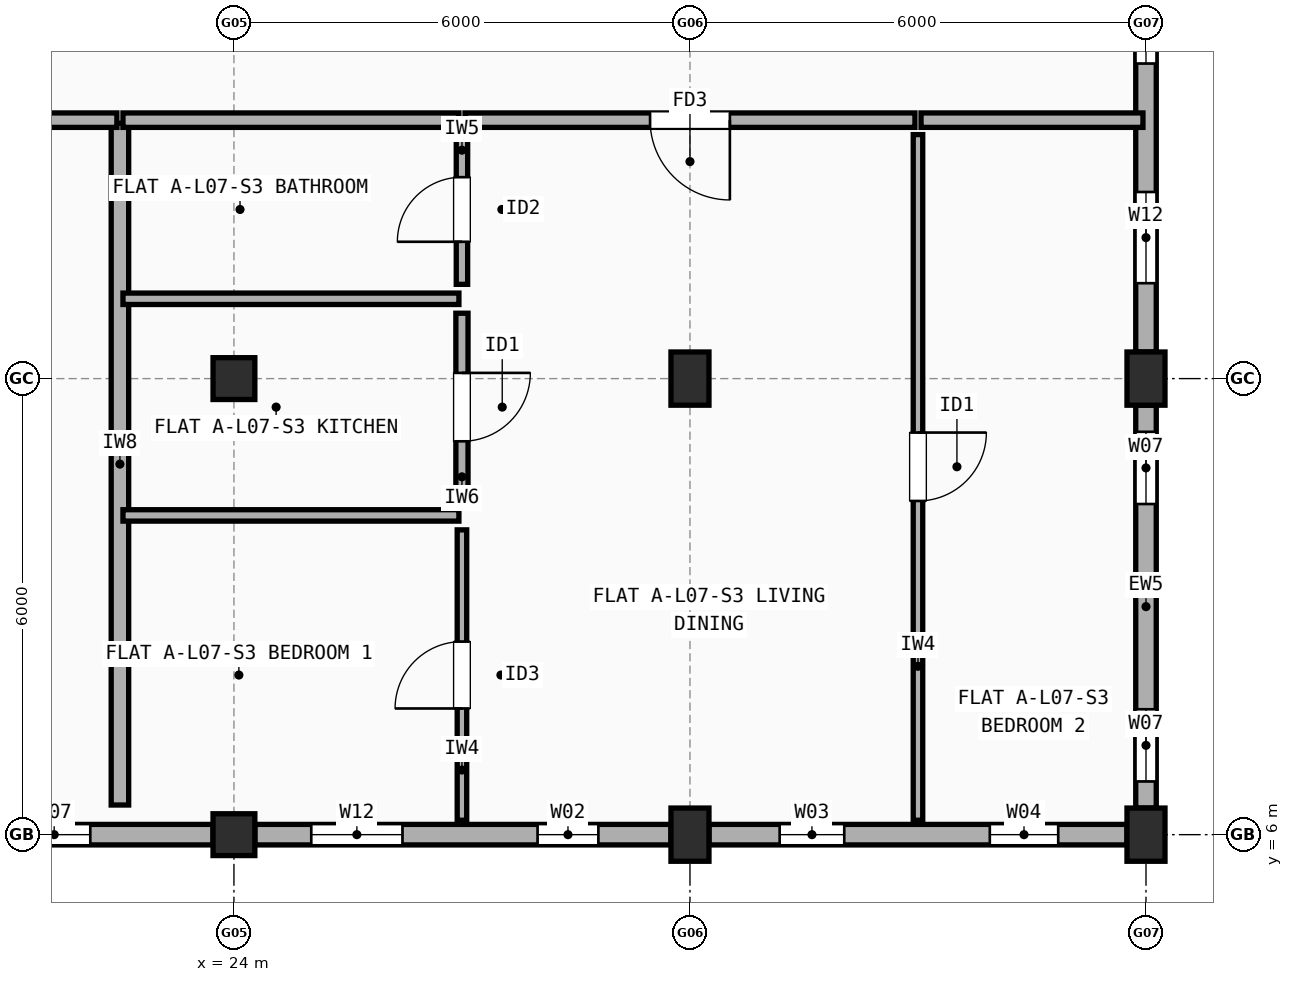
"""IFC4 building model, lengths in metres.
Left out: names, types, materials, properties, quantities, classifications, styles, units other than length and angle.
Written with IfcOpenShell. Run it as: python <this file> out.ifc"""

import sys

from ifc_helpers import new_model, si_unit, direction, frame, frame_2d, origin, origin_2d, place, context, subcontext, project, spatial, rectangle, extrude, element, fill, save


model = new_model("IFC4")
c1 = context("Model", 3, precision=1e-05, world=origin(), true_north=direction((0.0, 1.0)))
c2 = subcontext(c1, "Body", "Model", "MODEL_VIEW")
j1 = project(units=[si_unit("LENGTHUNIT", "METRE"), si_unit("PLANEANGLEUNIT", "RADIAN")], contexts=[c1])
p1 = place(None, origin())
s1 = spatial("IfcSite", under=j1, at=p1, CompositionType="ELEMENT")
p2 = place(p1, origin())
s2 = spatial("IfcBuilding", under=s1, at=p2, CompositionType="ELEMENT")
p3 = place(p2, frame((0.0, 0.0, 23.7)))
s3 = spatial("IfcBuildingStorey", under=s2, at=p3, CompositionType="ELEMENT", Elevation=23.7)
for number, where, z_axis, x_axis in (
    (1, (24.0, 6.0, 0.0), (0.0, 0.0, 1.0), (1.0, 0.0, 0.0)),
    (2, (24.0, 12.0, 0.0), (0.0, 0.0, 1.0), (1.0, 0.0, 0.0)),
):
    element("IfcColumn", number, at=place(p3, frame(where, z_axis=z_axis, x_axis=x_axis)), inside=s3, PredefinedType="COLUMN", context=c2, shape_type="SweptSolid", body=[
        extrude(rectangle(XDim=0.55, YDim=0.55, at=origin_2d()), origin(), (0.0, 0.0, 1.0), 2.975),
    ])
for number, where, z_axis, x_axis in (
    (3, (30.0, 6.0, 0.0), (0.0, 0.0, 1.0), (1.0, 0.0, 0.0)),
    (4, (30.0, 12.0, 0.0), (0.0, 0.0, 1.0), (1.0, 0.0, 0.0)),
    (5, (36.0, 6.0, 0.0), (0.0, 0.0, 1.0), (1.0, 0.0, 0.0)),
    (6, (36.0, 12.0, 0.0), (0.0, 0.0, 1.0), (1.0, 0.0, 0.0)),
):
    element("IfcColumn", number, at=place(p3, frame(where, z_axis=z_axis, x_axis=x_axis)), inside=s3, PredefinedType="COLUMN", context=c2, shape_type="SweptSolid", body=[
        extrude(rectangle(XDim=0.5, YDim=0.7, at=origin_2d()), origin(), (0.0, 0.0, 1.0), 2.975),
    ])
p4 = place(p3, frame((18.275, 6.0, 0.0), z_axis=(0.0, 0.0, 1.0), x_axis=(1.0, 0.0, 0.0)))
e7 = element("IfcWall", 7, at=p4, inside=s3, PredefinedType="STANDARD", context=c2, shape_type="SweptSolid", body=[
    extrude(rectangle(XDim=5.45, YDim=0.27, at=frame_2d((2.725, 0.0))), origin(), (0.0, 0.0, 1.0), 2.457),
])
p5 = place(p4, frame((0.35, 0.0, 0.9)))
e8 = element("IfcOpeningElement", 8, at=p5, cuts=e7, PredefinedType="OPENING", context=c2, shape_type="SweptSolid", body=[
    extrude(rectangle(XDim=0.95, YDim=1.35, at=frame_2d((0.475, 0.675))), frame((0.0, 0.145, 0.0), z_axis=(0.0, -1.0, 0.0), x_axis=(1.0, 0.0, 0.0)), (0.0, 0.0, 1.0), 0.29),
])
p6 = place(p4, frame((2.885, 0.0, 0.9)))
e9 = element("IfcOpeningElement", 9, at=p6, cuts=e7, PredefinedType="OPENING", context=c2, shape_type="SweptSolid", body=[
    extrude(rectangle(XDim=0.95, YDim=1.35, at=frame_2d((0.475, 0.675))), frame((0.0, 0.145, 0.0), z_axis=(0.0, -1.0, 0.0), x_axis=(1.0, 0.0, 0.0)), (0.0, 0.0, 1.0), 0.29),
])
p7 = place(p3, frame((24.275, 6.0, 0.0), z_axis=(0.0, 0.0, 1.0), x_axis=(1.0, 0.0, 0.0)))
e10 = element("IfcWall", 10, at=p7, inside=s3, PredefinedType="STANDARD", context=c2, shape_type="SweptSolid", body=[
    extrude(rectangle(XDim=5.475, YDim=0.27, at=frame_2d((2.738, 0.0))), origin(), (0.0, 0.0, 1.0), 2.457),
])
p8 = place(p7, frame((0.742, 0.0, 0.9)))
e11 = element("IfcOpeningElement", 11, at=p8, cuts=e10, PredefinedType="OPENING", context=c2, shape_type="SweptSolid", body=[
    extrude(rectangle(XDim=1.2, YDim=1.35, at=frame_2d((0.6, 0.675))), frame((0.0, 0.145, 0.0), z_axis=(0.0, -1.0, 0.0), x_axis=(1.0, 0.0, 0.0)), (0.0, 0.0, 1.0), 0.29),
])
p9 = place(p7, frame((3.72, 0.0, 0.9)))
e12 = element("IfcOpeningElement", 12, at=p9, cuts=e10, PredefinedType="OPENING", context=c2, shape_type="SweptSolid", body=[
    extrude(rectangle(XDim=0.8, YDim=1.2, at=frame_2d((0.4, 0.6))), frame((0.0, 0.145, 0.0), z_axis=(0.0, -1.0, 0.0), x_axis=(1.0, 0.0, 0.0)), (0.0, 0.0, 1.0), 0.29),
])
p10 = place(p3, frame((30.25, 6.0, 0.0), z_axis=(0.0, 0.0, 1.0), x_axis=(1.0, 0.0, 0.0)))
e13 = element("IfcWall", 13, at=p10, inside=s3, PredefinedType="STANDARD", context=c2, shape_type="SweptSolid", body=[
    extrude(rectangle(XDim=5.5, YDim=0.27, at=frame_2d((2.75, 0.0))), origin(), (0.0, 0.0, 1.0), 2.457),
])
p11 = place(p10, frame((0.93, 0.0, 0.9)))
e14 = element("IfcOpeningElement", 14, at=p11, cuts=e13, PredefinedType="OPENING", context=c2, shape_type="SweptSolid", body=[
    extrude(rectangle(XDim=0.85, YDim=1.25, at=frame_2d((0.425, 0.625))), frame((0.0, 0.145, 0.0), z_axis=(0.0, -1.0, 0.0), x_axis=(1.0, 0.0, 0.0)), (0.0, 0.0, 1.0), 0.29),
])
p12 = place(p10, frame((3.695, 0.0, 0.9)))
e15 = element("IfcOpeningElement", 15, at=p12, cuts=e13, PredefinedType="OPENING", context=c2, shape_type="SweptSolid", body=[
    extrude(rectangle(XDim=0.9, YDim=1.3, at=frame_2d((0.45, 0.65))), frame((0.0, 0.145, 0.0), z_axis=(0.0, -1.0, 0.0), x_axis=(1.0, 0.0, 0.0)), (0.0, 0.0, 1.0), 0.29),
])
p13 = place(p3, frame((36.0, 6.35, 0.0), z_axis=(0.0, 0.0, 1.0), x_axis=(0.0, 1.0, 0.0)))
e16 = element("IfcWall", 16, at=p13, inside=s3, PredefinedType="STANDARD", context=c2, shape_type="SweptSolid", body=[
    extrude(rectangle(XDim=5.3, YDim=0.27, at=frame_2d((2.65, 0.0))), origin(), (0.0, 0.0, 1.0), 2.457),
])
p14 = place(p13, frame((0.35, 0.0, 0.9)))
e17 = element("IfcOpeningElement", 17, at=p14, cuts=e16, PredefinedType="OPENING", context=c2, shape_type="SweptSolid", body=[
    extrude(rectangle(XDim=0.95, YDim=1.35, at=frame_2d((0.475, 0.675))), frame((0.0, 0.145, 0.0), z_axis=(0.0, -1.0, 0.0), x_axis=(1.0, 0.0, 0.0)), (0.0, 0.0, 1.0), 0.29),
])
p15 = place(p13, frame((4.0, 0.0, 0.9)))
e18 = element("IfcOpeningElement", 18, at=p15, cuts=e16, PredefinedType="OPENING", context=c2, shape_type="SweptSolid", body=[
    extrude(rectangle(XDim=0.95, YDim=1.35, at=frame_2d((0.475, 0.675))), frame((0.0, 0.145, 0.0), z_axis=(0.0, -1.0, 0.0), x_axis=(1.0, 0.0, 0.0)), (0.0, 0.0, 1.0), 0.29),
])
p16 = place(p3, frame((36.0, 12.35, 0.0), z_axis=(0.0, 0.0, 1.0), x_axis=(0.0, 1.0, 0.0)))
e19 = element("IfcWall", 19, at=p16, inside=s3, PredefinedType="STANDARD", context=c2, shape_type="SweptSolid", body=[
    extrude(rectangle(XDim=5.3, YDim=0.27, at=frame_2d((2.65, 0.0))), origin(), (0.0, 0.0, 1.0), 2.457),
])
p17 = place(p16, frame((0.905, 0.0, 0.9)))
e20 = element("IfcOpeningElement", 20, at=p17, cuts=e19, PredefinedType="OPENING", context=c2, shape_type="SweptSolid", body=[
    extrude(rectangle(XDim=1.2, YDim=1.35, at=frame_2d((0.6, 0.675))), frame((0.0, 0.145, 0.0), z_axis=(0.0, -1.0, 0.0), x_axis=(1.0, 0.0, 0.0)), (0.0, 0.0, 1.0), 0.29),
])
p18 = place(p16, frame((3.795, 0.0, 0.9)))
e21 = element("IfcOpeningElement", 21, at=p18, cuts=e19, PredefinedType="OPENING", context=c2, shape_type="SweptSolid", body=[
    extrude(rectangle(XDim=0.8, YDim=1.2, at=frame_2d((0.4, 0.6))), frame((0.0, 0.145, 0.0), z_axis=(0.0, -1.0, 0.0), x_axis=(1.0, 0.0, 0.0)), (0.0, 0.0, 1.0), 0.29),
])
p19 = place(p3, frame((22.5, 6.39, 0.0), z_axis=(0.0, 0.0, 1.0), x_axis=(0.0, 1.0, 0.0)))
e22 = element("IfcWall", 22, at=p19, inside=s3, PredefinedType="SOLIDWALL", context=c2, shape_type="SweptSolid", body=[
    extrude(rectangle(XDim=8.97, YDim=0.23, at=frame_2d((4.485, 0.0))), origin(), (0.0, 0.0, 1.0), 2.408),
])
p20 = place(p3, frame((16.54, 15.4, 0.0), z_axis=(0.0, 0.0, 1.0), x_axis=(1.0, 0.0, 0.0)))
e23 = element("IfcWall", 23, at=p20, inside=s3, PredefinedType="SOLIDWALL", context=c2, shape_type="SweptSolid", body=[
    extrude(rectangle(XDim=5.92, YDim=0.19, at=frame_2d((2.96, 0.0))), origin(), (0.0, 0.0, 1.0), 2.548),
])
p21 = place(p20, frame((2.47, 0.0, 0.0)))
e24 = element("IfcOpeningElement", 24, at=p21, cuts=e23, PredefinedType="OPENING", context=c2, shape_type="SweptSolid", body=[
    extrude(rectangle(XDim=0.98, YDim=2.15, at=frame_2d((0.49, 1.075))), frame((0.0, 0.105, 0.0), z_axis=(0.0, -1.0, 0.0), x_axis=(1.0, 0.0, 0.0)), (0.0, 0.0, 1.0), 0.21),
])
p22 = place(p3, frame((22.54, 15.4, 0.0), z_axis=(0.0, 0.0, 1.0), x_axis=(1.0, 0.0, 0.0)))
e25 = element("IfcWall", 25, at=p22, inside=s3, PredefinedType="SOLIDWALL", context=c2, shape_type="SweptSolid", body=[
    extrude(rectangle(XDim=4.42, YDim=0.19, at=frame_2d((2.21, 0.0))), origin(), (0.0, 0.0, 1.0), 2.548),
])
p23 = place(p3, frame((27.04, 15.4, 0.0), z_axis=(0.0, 0.0, 1.0), x_axis=(1.0, 0.0, 0.0)))
e26 = element("IfcWall", 26, at=p23, inside=s3, PredefinedType="SOLIDWALL", context=c2, shape_type="SweptSolid", body=[
    extrude(rectangle(XDim=5.92, YDim=0.19, at=frame_2d((2.96, 0.0))), origin(), (0.0, 0.0, 1.0), 2.457),
])
p24 = place(p23, frame((2.435, 0.0, 0.0)))
e27 = element("IfcOpeningElement", 27, at=p24, cuts=e26, PredefinedType="OPENING", context=c2, shape_type="SweptSolid", body=[
    extrude(rectangle(XDim=1.05, YDim=2.15, at=frame_2d((0.525, 1.075))), frame((0.0, 0.105, 0.0), z_axis=(0.0, -1.0, 0.0), x_axis=(1.0, 0.0, 0.0)), (0.0, 0.0, 1.0), 0.21),
])
p25 = place(p3, frame((27.0, 6.19, 0.0), z_axis=(0.0, 0.0, 1.0), x_axis=(0.0, 1.0, 0.0)))
e28 = element("IfcWall", 28, at=p25, inside=s3, PredefinedType="PARTITIONING", context=c2, shape_type="SweptSolid", body=[
    extrude(rectangle(XDim=3.82, YDim=0.125, at=frame_2d((1.91, 0.0))), origin(), (0.0, 0.0, 1.0), 2.975),
])
p26 = place(p25, frame((1.47, 0.0, 0.0)))
e29 = element("IfcOpeningElement", 29, at=p26, cuts=e28, PredefinedType="OPENING", context=c2, shape_type="SweptSolid", body=[
    extrude(rectangle(XDim=0.88, YDim=2.1, at=frame_2d((0.44, 1.05))), frame((0.0, 0.073, 0.0), z_axis=(0.0, -1.0, 0.0), x_axis=(1.0, 0.0, 0.0)), (0.0, 0.0, 1.0), 0.145),
])
p27 = place(p3, frame((27.0, 10.39, 0.0), z_axis=(0.0, 0.0, 1.0), x_axis=(0.0, 1.0, 0.0)))
e30 = element("IfcWall", 30, at=p27, inside=s3, PredefinedType="PLUMBINGWALL", context=c2, shape_type="SweptSolid", body=[
    extrude(rectangle(XDim=2.47, YDim=0.16, at=frame_2d((1.235, 0.0))), origin(), (0.0, 0.0, 1.0), 2.548),
])
p28 = place(p27, frame((0.785, 0.0, 0.0)))
e31 = element("IfcOpeningElement", 31, at=p28, cuts=e30, PredefinedType="OPENING", context=c2, shape_type="SweptSolid", body=[
    extrude(rectangle(XDim=0.9, YDim=2.1, at=frame_2d((0.45, 1.05))), frame((0.0, 0.09, 0.0), z_axis=(0.0, -1.0, 0.0), x_axis=(1.0, 0.0, 0.0)), (0.0, 0.0, 1.0), 0.18),
])
p29 = place(p3, frame((27.0, 13.24, 0.0), z_axis=(0.0, 0.0, 1.0), x_axis=(0.0, 1.0, 0.0)))
e32 = element("IfcWall", 32, at=p29, inside=s3, PredefinedType="PARTITIONING", context=c2, shape_type="SweptSolid", body=[
    extrude(rectangle(XDim=1.97, YDim=0.15, at=frame_2d((0.985, 0.0))), origin(), (0.0, 0.0, 1.0), 2.975),
])
p30 = place(p29, frame((0.56, 0.0, 0.0)))
e33 = element("IfcOpeningElement", 33, at=p30, cuts=e32, PredefinedType="OPENING", context=c2, shape_type="SweptSolid", body=[
    extrude(rectangle(XDim=0.85, YDim=2.1, at=frame_2d((0.425, 1.05))), frame((0.0, 0.085, 0.0), z_axis=(0.0, -1.0, 0.0), x_axis=(1.0, 0.0, 0.0)), (0.0, 0.0, 1.0), 0.17),
])
p31 = place(p3, frame((22.54, 10.2, 0.0), z_axis=(0.0, 0.0, 1.0), x_axis=(1.0, 0.0, 0.0)))
e34 = element("IfcWall", 34, at=p31, inside=s3, PredefinedType="PARTITIONING", context=c2, shape_type="SweptSolid", body=[
    extrude(rectangle(XDim=4.42, YDim=0.15, at=frame_2d((2.21, 0.0))), origin(), (0.0, 0.0, 1.0), 2.458),
])
p32 = place(p3, frame((22.54, 13.05, 0.0), z_axis=(0.0, 0.0, 1.0), x_axis=(1.0, 0.0, 0.0)))
e35 = element("IfcWall", 35, at=p32, inside=s3, PredefinedType="PARTITIONING", context=c2, shape_type="SweptSolid", body=[
    extrude(rectangle(XDim=4.42, YDim=0.15, at=frame_2d((2.21, 0.0))), origin(), (0.0, 0.0, 1.0), 2.548),
])
p33 = place(p3, frame((33.04, 15.4, 0.0), z_axis=(0.0, 0.0, 1.0), x_axis=(1.0, 0.0, 0.0)))
e36 = element("IfcWall", 36, at=p33, inside=s3, PredefinedType="SOLIDWALL", context=c2, shape_type="SweptSolid", body=[
    extrude(rectangle(XDim=2.92, YDim=0.19, at=frame_2d((1.46, 0.0))), origin(), (0.0, 0.0, 1.0), 2.457),
])
p34 = place(p3, frame((33.0, 6.19, 0.0), z_axis=(0.0, 0.0, 1.0), x_axis=(0.0, 1.0, 0.0)))
e37 = element("IfcWall", 37, at=p34, inside=s3, PredefinedType="PARTITIONING", context=c2, shape_type="SweptSolid", body=[
    extrude(rectangle(XDim=9.02, YDim=0.125, at=frame_2d((4.51, 0.0))), origin(), (0.0, 0.0, 1.0), 2.508),
])
p35 = place(p34, frame((4.2, 0.0, 0.0)))
e38 = element("IfcOpeningElement", 38, at=p35, cuts=e37, PredefinedType="OPENING", context=c2, shape_type="SweptSolid", body=[
    extrude(rectangle(XDim=0.9, YDim=2.1, at=frame_2d((0.45, 1.05))), frame((0.0, 0.073, 0.0), z_axis=(0.0, -1.0, 0.0), x_axis=(1.0, 0.0, 0.0)), (0.0, 0.0, 1.0), 0.145),
])
p36 = place(p6, origin())
e39 = element("IfcWindow", 39, at=p36, inside=s3, PartitioningType="SINGLE_PANEL", PredefinedType="WINDOW", context=c2, shape_type="SweptSolid", body=[
    extrude(rectangle(XDim=0.95, YDim=1.35, at=frame_2d((0.475, 0.675))), frame((0.0, 0.03, 0.0), z_axis=(0.0, -1.0, 0.0), x_axis=(1.0, 0.0, 0.0)), (0.0, 0.0, 1.0), 0.06),
])
fill(e9, e39)
p37 = place(p8, origin())
e40 = element("IfcWindow", 40, at=p37, inside=s3, PartitioningType="SINGLE_PANEL", PredefinedType="WINDOW", context=c2, shape_type="SweptSolid", body=[
    extrude(rectangle(XDim=1.2, YDim=1.35, at=frame_2d((0.6, 0.675))), frame((0.0, 0.03, 0.0), z_axis=(0.0, -1.0, 0.0), x_axis=(1.0, 0.0, 0.0)), (0.0, 0.0, 1.0), 0.06),
])
fill(e11, e40)
p38 = place(p9, origin())
e41 = element("IfcWindow", 41, at=p38, inside=s3, PartitioningType="SINGLE_PANEL", PredefinedType="WINDOW", context=c2, shape_type="SweptSolid", body=[
    extrude(rectangle(XDim=0.8, YDim=1.2, at=frame_2d((0.4, 0.6))), frame((0.0, 0.03, 0.0), z_axis=(0.0, -1.0, 0.0), x_axis=(1.0, 0.0, 0.0)), (0.0, 0.0, 1.0), 0.06),
])
fill(e12, e41)
p39 = place(p11, origin())
e42 = element("IfcWindow", 42, at=p39, inside=s3, PartitioningType="SINGLE_PANEL", PredefinedType="WINDOW", context=c2, shape_type="SweptSolid", body=[
    extrude(rectangle(XDim=0.85, YDim=1.25, at=frame_2d((0.425, 0.625))), frame((0.0, 0.03, 0.0), z_axis=(0.0, -1.0, 0.0), x_axis=(1.0, 0.0, 0.0)), (0.0, 0.0, 1.0), 0.06),
])
fill(e14, e42)
p40 = place(p12, origin())
e43 = element("IfcWindow", 43, at=p40, inside=s3, PartitioningType="SINGLE_PANEL", PredefinedType="WINDOW", context=c2, shape_type="SweptSolid", body=[
    extrude(rectangle(XDim=0.9, YDim=1.3, at=frame_2d((0.45, 0.65))), frame((0.0, 0.03, 0.0), z_axis=(0.0, -1.0, 0.0), x_axis=(1.0, 0.0, 0.0)), (0.0, 0.0, 1.0), 0.06),
])
fill(e15, e43)
p41 = place(p14, origin())
e44 = element("IfcWindow", 44, at=p41, inside=s3, PartitioningType="SINGLE_PANEL", PredefinedType="WINDOW", context=c2, shape_type="SweptSolid", body=[
    extrude(rectangle(XDim=0.95, YDim=1.35, at=frame_2d((0.475, 0.675))), frame((0.0, 0.03, 0.0), z_axis=(0.0, -1.0, 0.0), x_axis=(1.0, 0.0, 0.0)), (0.0, 0.0, 1.0), 0.06),
])
fill(e17, e44)
p42 = place(p15, origin())
e45 = element("IfcWindow", 45, at=p42, inside=s3, PartitioningType="SINGLE_PANEL", PredefinedType="WINDOW", context=c2, shape_type="SweptSolid", body=[
    extrude(rectangle(XDim=0.95, YDim=1.35, at=frame_2d((0.475, 0.675))), frame((0.0, 0.03, 0.0), z_axis=(0.0, -1.0, 0.0), x_axis=(1.0, 0.0, 0.0)), (0.0, 0.0, 1.0), 0.06),
])
fill(e18, e45)
p43 = place(p17, origin())
e46 = element("IfcWindow", 46, at=p43, inside=s3, PartitioningType="SINGLE_PANEL", PredefinedType="WINDOW", context=c2, shape_type="SweptSolid", body=[
    extrude(rectangle(XDim=1.2, YDim=1.35, at=frame_2d((0.6, 0.675))), frame((0.0, 0.03, 0.0), z_axis=(0.0, -1.0, 0.0), x_axis=(1.0, 0.0, 0.0)), (0.0, 0.0, 1.0), 0.06),
])
fill(e20, e46)
p44 = place(p18, origin())
e47 = element("IfcWindow", 47, at=p44, inside=s3, PartitioningType="SINGLE_PANEL", PredefinedType="WINDOW", context=c2, shape_type="SweptSolid", body=[
    extrude(rectangle(XDim=0.8, YDim=1.2, at=frame_2d((0.4, 0.6))), frame((0.0, 0.03, 0.0), z_axis=(0.0, -1.0, 0.0), x_axis=(1.0, 0.0, 0.0)), (0.0, 0.0, 1.0), 0.06),
])
fill(e21, e47)
p45 = place(p24, origin())
e48 = element("IfcDoor", 48, at=p45, inside=s3, OperationType="SINGLE_SWING_RIGHT", PredefinedType="DOOR", context=c2, shape_type="SweptSolid", body=[
    extrude(rectangle(XDim=1.05, YDim=2.15, at=frame_2d((0.525, 1.075))), frame((0.0, 0.025, 0.0), z_axis=(0.0, -1.0, 0.0), x_axis=(1.0, 0.0, 0.0)), (0.0, 0.0, 1.0), 0.05),
])
fill(e27, e48)
p46 = place(p26, origin())
e49 = element("IfcDoor", 49, at=p46, inside=s3, OperationType="SINGLE_SWING_LEFT", PredefinedType="DOOR", context=c2, shape_type="SweptSolid", body=[
    extrude(rectangle(XDim=0.88, YDim=2.1, at=frame_2d((0.44, 1.05))), frame((0.0, 0.025, 0.0), z_axis=(0.0, -1.0, 0.0), x_axis=(1.0, 0.0, 0.0)), (0.0, 0.0, 1.0), 0.05),
])
fill(e29, e49)
p47 = place(p28, origin())
e50 = element("IfcDoor", 50, at=p47, inside=s3, OperationType="SINGLE_SWING_RIGHT", PredefinedType="DOOR", context=c2, shape_type="SweptSolid", body=[
    extrude(rectangle(XDim=0.9, YDim=2.1, at=frame_2d((0.45, 1.05))), frame((0.0, 0.025, 0.0), z_axis=(0.0, -1.0, 0.0), x_axis=(1.0, 0.0, 0.0)), (0.0, 0.0, 1.0), 0.05),
])
fill(e31, e50)
p48 = place(p30, origin())
e51 = element("IfcDoor", 51, at=p48, inside=s3, OperationType="SINGLE_SWING_LEFT", PredefinedType="DOOR", context=c2, shape_type="SweptSolid", body=[
    extrude(rectangle(XDim=0.85, YDim=2.1, at=frame_2d((0.425, 1.05))), frame((0.0, 0.025, 0.0), z_axis=(0.0, -1.0, 0.0), x_axis=(1.0, 0.0, 0.0)), (0.0, 0.0, 1.0), 0.05),
])
fill(e33, e51)
p49 = place(p35, origin())
e52 = element("IfcDoor", 52, at=p49, inside=s3, OperationType="SINGLE_SWING_RIGHT", PredefinedType="DOOR", context=c2, shape_type="SweptSolid", body=[
    extrude(rectangle(XDim=0.9, YDim=2.1, at=frame_2d((0.45, 1.05))), frame((0.0, 0.025, 0.0), z_axis=(0.0, -1.0, 0.0), x_axis=(1.0, 0.0, 0.0)), (0.0, 0.0, 1.0), 0.05),
])
fill(e38, e52)
save(model, sys.argv[1])
